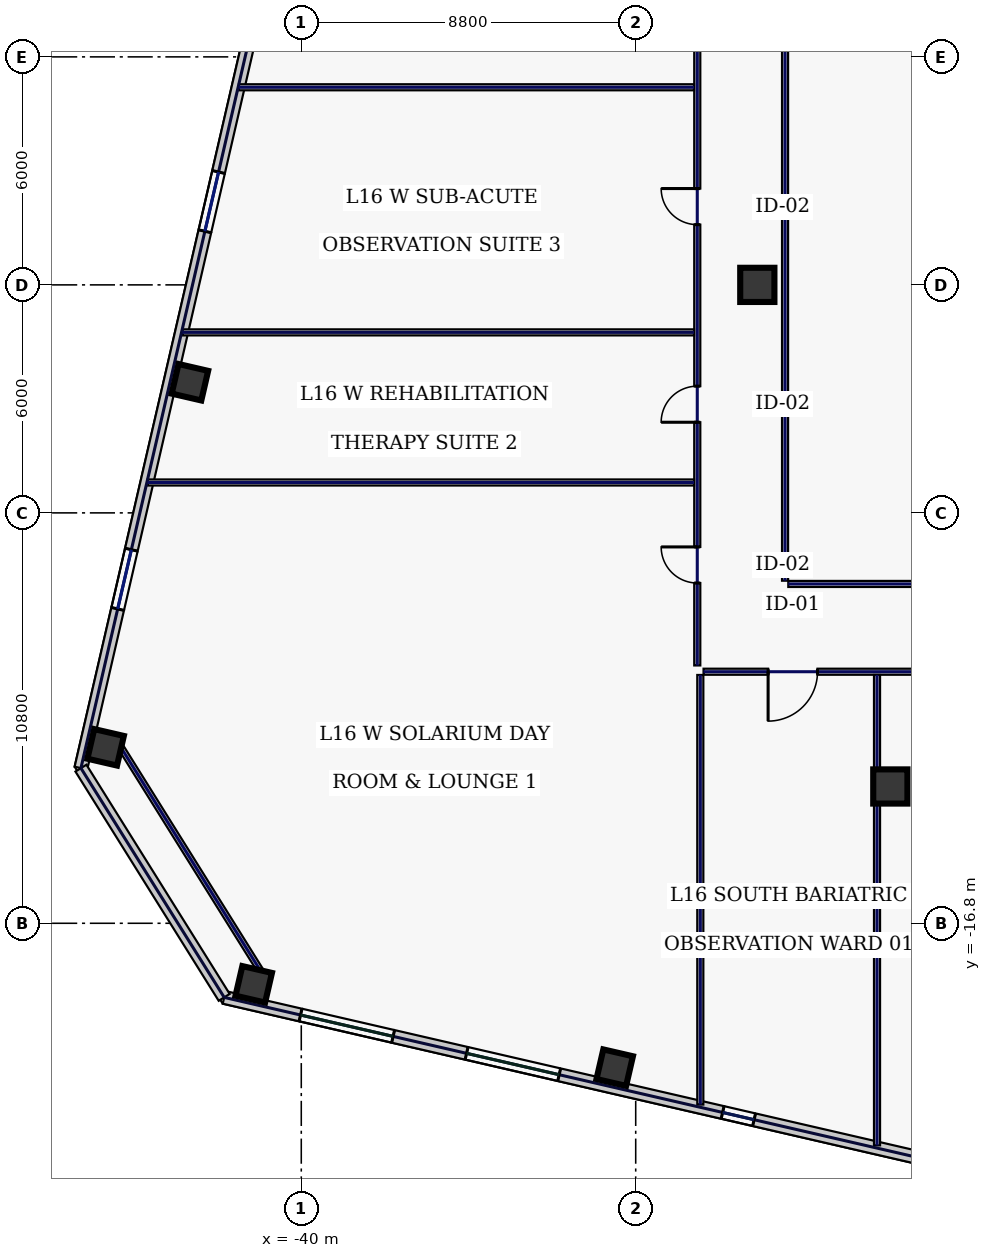
"""IFC4 building model, lengths in metres.
Left out: names, types, materials, properties, quantities, classifications, styles, units other than length and angle.
Written with IfcOpenShell. Run it as: python <this file> out.ifc"""

import sys

from ifc_helpers import new_model, si_unit, direction, frame, frame_2d, origin, origin_2d, place, context, subcontext, project, spatial, rectangle, hollow_rectangle, extrude, element, fill, save


model = new_model("IFC4")
c1 = context("Model", 3, precision=1e-05, world=origin(), true_north=direction((0.0, 1.0)))
c2 = subcontext(c1, "Body", "Model", "MODEL_VIEW")
j1 = project(units=[si_unit("LENGTHUNIT", "METRE"), si_unit("PLANEANGLEUNIT", "RADIAN")], contexts=[c1])
p1 = place(None, origin())
s1 = spatial("IfcSite", under=j1, at=p1, CompositionType="ELEMENT")
p2 = place(p1, origin())
s2 = spatial("IfcBuilding", under=s1, at=p2, CompositionType="ELEMENT")
p3 = place(p2, frame((0.0, 0.0, 75.4)))
s3 = spatial("IfcBuildingStorey", under=s2, at=p3, CompositionType="ELEMENT", Elevation=75.4)
for number, where, z_axis, x_axis in (
    (1, (-24.5, -13.2, 0.0), (0.0, 0.0, 1.0), (1.0, 0.0, 0.0)),
    (2, (-28.0, 0.0, 0.0), (0.0, 0.0, 1.0), (1.0, 0.0, 0.0)),
):
    element("IfcColumn", number, at=place(p3, frame(where, z_axis=z_axis, x_axis=x_axis)), inside=s3, PredefinedType="COLUMN", context=c2, shape_type="SweptSolid", body=[
        extrude(hollow_rectangle(XDim=0.9, YDim=0.9, WallThickness=0.04, at=origin_2d()), origin(), (0.0, 0.0, 1.0), 3.74),
    ])
for number, where, z_axis, x_axis in (
    (3, (-41.251, -18.406, 0.0), (0.0, 0.0, 1.0), (0.974, -0.225, 0.0)),
    (4, (-31.752, -20.599, 0.0), (0.0, 0.0, 1.0), (0.974, -0.225, 0.0)),
    (5, (-42.93, -2.562, 0.0), (0.0, 0.0, 1.0), (0.974, -0.225, 0.0)),
    (6, (-45.148, -12.169, 0.0), (0.0, 0.0, 1.0), (0.974, -0.225, 0.0)),
):
    element("IfcColumn", number, at=place(p3, frame(where, z_axis=z_axis, x_axis=x_axis)), inside=s3, PredefinedType="COLUMN", context=c2, shape_type="SweptSolid", body=[
        extrude(hollow_rectangle(XDim=0.8, YDim=0.8, WallThickness=0.036, at=origin_2d()), origin(), (0.0, 0.0, 1.0), 3.74),
    ])
p4 = place(p3, frame((-42.029, -18.75, 0.0), z_axis=(0.0, 0.0, 1.0), x_axis=(0.97436993772, -0.224951604723, 0.0)))
e7 = element("IfcWall", 7, at=p4, inside=s3, PredefinedType="STANDARD", context=c2, shape_type="SweptSolid", body=[
    extrude(rectangle(XDim=22.651, YDim=0.34, at=frame_2d((11.326, 0.0))), origin(), (0.0, 0.0, 1.0), 3.74),
])
p5 = place(p4, frame((2.062, 0.0, 0.72)))
e8 = element("IfcOpeningElement", 8, at=p5, cuts=e7, PredefinedType="OPENING", context=c2, shape_type="SweptSolid", body=[
    extrude(rectangle(XDim=2.5, YDim=2.15, at=frame_2d((1.25, 1.075))), frame((0.0, 0.18, 0.0), z_axis=(0.0, -1.0, 0.0), x_axis=(1.0, 0.0, 0.0)), (0.0, 0.0, 1.0), 0.36),
])
p6 = place(p4, frame((6.546, 0.0, 0.72)))
e9 = element("IfcOpeningElement", 9, at=p6, cuts=e7, PredefinedType="OPENING", context=c2, shape_type="SweptSolid", body=[
    extrude(rectangle(XDim=2.5, YDim=2.15, at=frame_2d((1.25, 1.075))), frame((0.0, 0.18, 0.0), z_axis=(0.0, -1.0, 0.0), x_axis=(1.0, 0.0, 0.0)), (0.0, 0.0, 1.0), 0.36),
])
p7 = place(p4, frame((13.461, 0.0, 0.72)))
e10 = element("IfcOpeningElement", 10, at=p7, cuts=e7, PredefinedType="OPENING", context=c2, shape_type="SweptSolid", body=[
    extrude(rectangle(XDim=0.85, YDim=1.85, at=frame_2d((0.425, 0.925))), frame((0.0, 0.18, 0.0), z_axis=(0.0, -1.0, 0.0), x_axis=(1.0, 0.0, 0.0)), (0.0, 0.0, 1.0), 0.36),
])
p8 = place(p3, frame((-36.62, 27.037, 0.0), z_axis=(0.0, 0.0, 1.0), x_axis=(-0.224951280646, -0.974370012539, 0.0)))
e11 = element("IfcWall", 11, at=p8, inside=s3, PredefinedType="STANDARD", context=c2, shape_type="SweptSolid", body=[
    extrude(rectangle(XDim=40.8, YDim=0.34, at=frame_2d((20.4, 0.0))), origin(), (0.0, 0.0, 1.0), 3.74),
])
p9 = place(p8, frame((4.3, 0.0, 0.58)))
e12 = element("IfcOpeningElement", 12, at=p9, cuts=e11, PredefinedType="OPENING", context=c2, shape_type="SweptSolid", body=[
    extrude(rectangle(XDim=1.6, YDim=2.3, at=frame_2d((0.8, 1.15))), frame((0.0, 0.18, 0.0), z_axis=(0.0, -1.0, 0.0), x_axis=(1.0, 0.0, 0.0)), (0.0, 0.0, 1.0), 0.36),
])
p10 = place(p8, frame((14.5, 0.0, 0.58)))
e13 = element("IfcOpeningElement", 13, at=p10, cuts=e11, PredefinedType="OPENING", context=c2, shape_type="SweptSolid", body=[
    extrude(rectangle(XDim=1.6, YDim=2.3, at=frame_2d((0.8, 1.15))), frame((0.0, 0.18, 0.0), z_axis=(0.0, -1.0, 0.0), x_axis=(1.0, 0.0, 0.0)), (0.0, 0.0, 1.0), 0.36),
])
p11 = place(p8, frame((24.7, 0.0, 0.58)))
e14 = element("IfcOpeningElement", 14, at=p11, cuts=e11, PredefinedType="OPENING", context=c2, shape_type="SweptSolid", body=[
    extrude(rectangle(XDim=1.6, YDim=2.3, at=frame_2d((0.8, 1.15))), frame((0.0, 0.18, 0.0), z_axis=(0.0, -1.0, 0.0), x_axis=(1.0, 0.0, 0.0)), (0.0, 0.0, 1.0), 0.36),
])
p12 = place(p8, frame((34.9, 0.0, 0.58)))
e15 = element("IfcOpeningElement", 15, at=p12, cuts=e11, PredefinedType="OPENING", context=c2, shape_type="SweptSolid", body=[
    extrude(rectangle(XDim=1.6, YDim=2.3, at=frame_2d((0.8, 1.15))), frame((0.0, 0.18, 0.0), z_axis=(0.0, -1.0, 0.0), x_axis=(1.0, 0.0, 0.0)), (0.0, 0.0, 1.0), 0.36),
])
p13 = place(p3, frame((-45.798, -12.717, 0.0), z_axis=(0.0, 0.0, 1.0), x_axis=(0.529906387556, -0.848056142261, 0.0)))
e16 = element("IfcWall", 16, at=p13, inside=s3, PredefinedType="STANDARD", context=c2, shape_type="SweptSolid", body=[
    extrude(rectangle(XDim=7.114, YDim=0.34, at=frame_2d((3.557, 0.0))), origin(), (0.0, 0.0, 1.0), 3.74),
])
p14 = place(p3, frame((-44.86, -11.989, 0.0), z_axis=(0.0, 0.0, 1.0), x_axis=(0.52991239767, -0.848052386823, 0.0)))
e17 = element("IfcWall", 17, at=p14, inside=s3, PredefinedType="PARTITIONING", context=c2, shape_type="SweptSolid", body=[
    extrude(rectangle(XDim=7.354, YDim=0.16, at=frame_2d((3.677, 0.0))), origin(), (0.0, 0.0, 1.0), 3.74),
])
p15 = place(p3, frame((-29.58, -10.015, 0.0), z_axis=(0.0, 0.0, 1.0), x_axis=(0.0, 1.0, 0.0)))
e18 = element("IfcWall", 18, at=p15, inside=s3, PredefinedType="PARTITIONING", context=c2, shape_type="SweptSolid", body=[
    extrude(rectangle(XDim=20.13, YDim=0.16, at=frame_2d((10.065, 0.0))), origin(), (0.0, 0.0, 1.0), 3.74),
])
p16 = place(p15, frame((2.169, 0.0, 0.0)))
e19 = element("IfcOpeningElement", 19, at=p16, cuts=e18, PredefinedType="OPENING", context=c2, shape_type="SweptSolid", body=[
    extrude(rectangle(XDim=0.95, YDim=2.2, at=frame_2d((0.475, 1.1))), frame((0.0, 0.09, 0.0), z_axis=(0.0, -1.0, 0.0), x_axis=(1.0, 0.0, 0.0)), (0.0, 0.0, 1.0), 0.18),
])
p17 = place(p15, frame((6.4, 0.0, 0.0)))
e20 = element("IfcOpeningElement", 20, at=p17, cuts=e18, PredefinedType="OPENING", context=c2, shape_type="SweptSolid", body=[
    extrude(rectangle(XDim=0.95, YDim=2.2, at=frame_2d((0.475, 1.1))), frame((0.0, 0.09, 0.0), z_axis=(0.0, -1.0, 0.0), x_axis=(1.0, 0.0, 0.0)), (0.0, 0.0, 1.0), 0.18),
])
p18 = place(p15, frame((11.6, 0.0, 0.0)))
e21 = element("IfcOpeningElement", 21, at=p18, cuts=e18, PredefinedType="OPENING", context=c2, shape_type="SweptSolid", body=[
    extrude(rectangle(XDim=0.95, YDim=2.2, at=frame_2d((0.475, 1.1))), frame((0.0, 0.09, 0.0), z_axis=(0.0, -1.0, 0.0), x_axis=(1.0, 0.0, 0.0)), (0.0, 0.0, 1.0), 0.18),
])
p19 = place(p15, frame((17.131, 0.0, 0.0)))
e22 = element("IfcOpeningElement", 22, at=p19, cuts=e18, PredefinedType="OPENING", context=c2, shape_type="SweptSolid", body=[
    extrude(rectangle(XDim=0.95, YDim=2.2, at=frame_2d((0.475, 1.1))), frame((0.0, 0.09, 0.0), z_axis=(0.0, -1.0, 0.0), x_axis=(1.0, 0.0, 0.0)), (0.0, 0.0, 1.0), 0.18),
])
p20 = place(p3, frame((29.415, -10.18, 0.0), z_axis=(0.0, 0.0, 1.0), x_axis=(-1.0, 0.0, 0.0)))
e23 = element("IfcWall", 23, at=p20, inside=s3, PredefinedType="PARTITIONING", context=c2, shape_type="SweptSolid", body=[
    extrude(rectangle(XDim=58.83, YDim=0.16, at=frame_2d((29.415, 0.0))), origin(), (0.0, 0.0, 1.0), 3.74),
])
p21 = place(p20, frame((55.831, 0.0, 0.0)))
e24 = element("IfcOpeningElement", 24, at=p21, cuts=e23, PredefinedType="OPENING", context=c2, shape_type="SweptSolid", body=[
    extrude(rectangle(XDim=1.3, YDim=2.2, at=frame_2d((0.65, 1.1))), frame((0.0, 0.09, 0.0), z_axis=(0.0, -1.0, 0.0), x_axis=(1.0, 0.0, 0.0)), (0.0, 0.0, 1.0), 0.18),
])
p22 = place(p20, frame((49.775, 0.0, 0.0)))
e25 = element("IfcOpeningElement", 25, at=p22, cuts=e23, PredefinedType="OPENING", context=c2, shape_type="SweptSolid", body=[
    extrude(rectangle(XDim=1.3, YDim=2.2, at=frame_2d((0.65, 1.1))), frame((0.0, 0.09, 0.0), z_axis=(0.0, -1.0, 0.0), x_axis=(1.0, 0.0, 0.0)), (0.0, 0.0, 1.0), 0.18),
])
p23 = place(p20, frame((43.2, 0.0, 0.0)))
e26 = element("IfcOpeningElement", 26, at=p23, cuts=e23, PredefinedType="OPENING", context=c2, shape_type="SweptSolid", body=[
    extrude(rectangle(XDim=0.95, YDim=2.2, at=frame_2d((0.475, 1.1))), frame((0.0, 0.09, 0.0), z_axis=(0.0, -1.0, 0.0), x_axis=(1.0, 0.0, 0.0)), (0.0, 0.0, 1.0), 0.18),
])
p24 = place(p20, frame((38.0, 0.0, 0.0)))
e27 = element("IfcOpeningElement", 27, at=p24, cuts=e23, PredefinedType="OPENING", context=c2, shape_type="SweptSolid", body=[
    extrude(rectangle(XDim=0.95, YDim=2.2, at=frame_2d((0.475, 1.1))), frame((0.0, 0.09, 0.0), z_axis=(0.0, -1.0, 0.0), x_axis=(1.0, 0.0, 0.0)), (0.0, 0.0, 1.0), 0.18),
])
p25 = place(p20, frame((32.7, 0.0, 0.0)))
e28 = element("IfcOpeningElement", 28, at=p25, cuts=e23, PredefinedType="OPENING", context=c2, shape_type="SweptSolid", body=[
    extrude(rectangle(XDim=0.95, YDim=2.2, at=frame_2d((0.475, 1.1))), frame((0.0, 0.09, 0.0), z_axis=(0.0, -1.0, 0.0), x_axis=(1.0, 0.0, 0.0)), (0.0, 0.0, 1.0), 0.18),
])
p26 = place(p20, frame((27.3, 0.0, 0.0)))
e29 = element("IfcOpeningElement", 29, at=p26, cuts=e23, PredefinedType="OPENING", context=c2, shape_type="SweptSolid", body=[
    extrude(rectangle(XDim=0.95, YDim=2.2, at=frame_2d((0.475, 1.1))), frame((0.0, 0.09, 0.0), z_axis=(0.0, -1.0, 0.0), x_axis=(1.0, 0.0, 0.0)), (0.0, 0.0, 1.0), 0.18),
])
p27 = place(p20, frame((21.87, 0.0, 0.0)))
e30 = element("IfcOpeningElement", 30, at=p27, cuts=e23, PredefinedType="OPENING", context=c2, shape_type="SweptSolid", body=[
    extrude(rectangle(XDim=1.05, YDim=2.2, at=frame_2d((0.525, 1.1))), frame((0.0, 0.09, 0.0), z_axis=(0.0, -1.0, 0.0), x_axis=(1.0, 0.0, 0.0)), (0.0, 0.0, 1.0), 0.18),
])
p28 = place(p20, frame((16.41, 0.0, 0.0)))
e31 = element("IfcOpeningElement", 31, at=p28, cuts=e23, PredefinedType="OPENING", context=c2, shape_type="SweptSolid", body=[
    extrude(rectangle(XDim=0.95, YDim=2.2, at=frame_2d((0.475, 1.1))), frame((0.0, 0.09, 0.0), z_axis=(0.0, -1.0, 0.0), x_axis=(1.0, 0.0, 0.0)), (0.0, 0.0, 1.0), 0.18),
])
p29 = place(p20, frame((11.66, 0.0, 0.0)))
e32 = element("IfcOpeningElement", 32, at=p29, cuts=e23, PredefinedType="OPENING", context=c2, shape_type="SweptSolid", body=[
    extrude(rectangle(XDim=1.45, YDim=2.2, at=frame_2d((0.725, 1.1))), frame((0.0, 0.09, 0.0), z_axis=(0.0, -1.0, 0.0), x_axis=(1.0, 0.0, 0.0)), (0.0, 0.0, 1.0), 0.18),
])
p30 = place(p20, frame((7.97, 0.0, 0.0)))
e33 = element("IfcOpeningElement", 33, at=p30, cuts=e23, PredefinedType="OPENING", context=c2, shape_type="SweptSolid", body=[
    extrude(rectangle(XDim=1.3, YDim=2.2, at=frame_2d((0.65, 1.1))), frame((0.0, 0.09, 0.0), z_axis=(0.0, -1.0, 0.0), x_axis=(1.0, 0.0, 0.0)), (0.0, 0.0, 1.0), 0.18),
])
p31 = place(p20, frame((4.375, 0.0, 0.0)))
e34 = element("IfcOpeningElement", 34, at=p31, cuts=e23, PredefinedType="OPENING", context=c2, shape_type="SweptSolid", body=[
    extrude(rectangle(XDim=1.3, YDim=2.2, at=frame_2d((0.65, 1.1))), frame((0.0, 0.09, 0.0), z_axis=(0.0, -1.0, 0.0), x_axis=(1.0, 0.0, 0.0)), (0.0, 0.0, 1.0), 0.18),
])
p32 = place(p20, frame((1.244, 0.0, 0.0)))
e35 = element("IfcOpeningElement", 35, at=p32, cuts=e23, PredefinedType="OPENING", context=c2, shape_type="SweptSolid", body=[
    extrude(rectangle(XDim=1.05, YDim=2.2, at=frame_2d((0.525, 1.1))), frame((0.0, 0.09, 0.0), z_axis=(0.0, -1.0, 0.0), x_axis=(1.0, 0.0, 0.0)), (0.0, 0.0, 1.0), 0.18),
])
p33 = place(p3, frame((-27.27, 7.885, 0.0), z_axis=(0.0, 0.0, 1.0), x_axis=(0.0, -1.0, 0.0)))
e36 = element("IfcWall", 36, at=p33, inside=s3, PredefinedType="PARTITIONING", context=c2, shape_type="SweptSolid", body=[
    extrude(rectangle(XDim=15.67, YDim=0.16, at=frame_2d((7.835, 0.0))), origin(), (0.0, 0.0, 1.0), 3.74),
])
p34 = place(p3, frame((-27.185, -7.87, 0.0), z_axis=(0.0, 0.0, 1.0), x_axis=(1.0, 0.0, 0.0)))
e37 = element("IfcWall", 37, at=p34, inside=s3, PredefinedType="PARTITIONING", context=c2, shape_type="SweptSolid", body=[
    extrude(rectangle(XDim=16.52, YDim=0.16, at=frame_2d((8.26, 0.0))), origin(), (0.0, 0.0, 1.0), 3.74),
])
p35 = place(p3, frame((-29.5, -21.571, 0.0), z_axis=(0.0, 0.0, 1.0), x_axis=(0.0, 1.0, 0.0)))
e38 = element("IfcWall", 38, at=p35, inside=s3, PredefinedType="PARTITIONING", context=c2, shape_type="SweptSolid", body=[
    extrude(rectangle(XDim=11.306, YDim=0.16, at=frame_2d((5.653, 0.0))), origin(), (0.0, 0.0, 1.0), 3.74),
])
p36 = place(p3, frame((-24.85, -22.644, 0.0), z_axis=(0.0, 0.0, 1.0), x_axis=(0.0, 1.0, 0.0)))
e39 = element("IfcWall", 39, at=p36, inside=s3, PredefinedType="PARTITIONING", context=c2, shape_type="SweptSolid", body=[
    extrude(rectangle(XDim=12.379, YDim=0.16, at=frame_2d((6.189, 0.0))), origin(), (0.0, 0.0, 1.0), 3.74),
])
p37 = place(p3, frame((-44.042, -5.2, 0.0), z_axis=(0.0, 0.0, 1.0), x_axis=(1.0, 0.0, 0.0)))
e40 = element("IfcWall", 40, at=p37, inside=s3, PredefinedType="PARTITIONING", context=c2, shape_type="SweptSolid", body=[
    extrude(rectangle(XDim=14.377, YDim=0.16, at=frame_2d((7.188, 0.0))), origin(), (0.0, 0.0, 1.0), 3.74),
])
p38 = place(p3, frame((-43.13, -1.25, 0.0), z_axis=(0.0, 0.0, 1.0), x_axis=(1.0, 0.0, 0.0)))
e41 = element("IfcWall", 41, at=p38, inside=s3, PredefinedType="PARTITIONING", context=c2, shape_type="SweptSolid", body=[
    extrude(rectangle(XDim=13.465, YDim=0.16, at=frame_2d((6.732, 0.0))), origin(), (0.0, 0.0, 1.0), 3.235),
])
p39 = place(p3, frame((-41.641, 5.2, 0.0), z_axis=(0.0, 0.0, 1.0), x_axis=(1.0, 0.0, 0.0)))
e42 = element("IfcWall", 42, at=p39, inside=s3, PredefinedType="PARTITIONING", context=c2, shape_type="SweptSolid", body=[
    extrude(rectangle(XDim=11.976, YDim=0.16, at=frame_2d((5.988, 0.0))), origin(), (0.0, 0.0, 1.0), 3.74),
])
p40 = place(p5, origin())
e43 = element("IfcWindow", 43, at=p40, inside=s3, PartitioningType="SINGLE_PANEL", PredefinedType="WINDOW", context=c2, shape_type="SweptSolid", body=[
    extrude(rectangle(XDim=2.5, YDim=2.15, at=frame_2d((1.25, 1.075))), frame((0.0, 0.03, 0.0), z_axis=(0.0, -1.0, 0.0), x_axis=(1.0, 0.0, 0.0)), (0.0, 0.0, 1.0), 0.06),
])
fill(e8, e43)
p41 = place(p6, origin())
e44 = element("IfcWindow", 44, at=p41, inside=s3, PartitioningType="SINGLE_PANEL", PredefinedType="WINDOW", context=c2, shape_type="SweptSolid", body=[
    extrude(rectangle(XDim=2.5, YDim=2.15, at=frame_2d((1.25, 1.075))), frame((0.0, 0.03, 0.0), z_axis=(0.0, -1.0, 0.0), x_axis=(1.0, 0.0, 0.0)), (0.0, 0.0, 1.0), 0.06),
])
fill(e9, e44)
p42 = place(p7, origin())
e45 = element("IfcWindow", 45, at=p42, inside=s3, PartitioningType="SINGLE_PANEL", PredefinedType="WINDOW", context=c2, shape_type="SweptSolid", body=[
    extrude(rectangle(XDim=0.85, YDim=1.85, at=frame_2d((0.425, 0.925))), frame((0.0, 0.03, 0.0), z_axis=(0.0, -1.0, 0.0), x_axis=(1.0, 0.0, 0.0)), (0.0, 0.0, 1.0), 0.06),
])
fill(e10, e45)
p43 = place(p11, origin())
e46 = element("IfcWindow", 46, at=p43, inside=s3, PartitioningType="SINGLE_PANEL", PredefinedType="WINDOW", context=c2, shape_type="SweptSolid", body=[
    extrude(rectangle(XDim=1.6, YDim=2.3, at=frame_2d((0.8, 1.15))), frame((0.0, 0.03, 0.0), z_axis=(0.0, -1.0, 0.0), x_axis=(1.0, 0.0, 0.0)), (0.0, 0.0, 1.0), 0.06),
])
fill(e14, e46)
p44 = place(p12, origin())
e47 = element("IfcWindow", 47, at=p44, inside=s3, PartitioningType="SINGLE_PANEL", PredefinedType="WINDOW", context=c2, shape_type="SweptSolid", body=[
    extrude(rectangle(XDim=1.6, YDim=2.3, at=frame_2d((0.8, 1.15))), frame((0.0, 0.03, 0.0), z_axis=(0.0, -1.0, 0.0), x_axis=(1.0, 0.0, 0.0)), (0.0, 0.0, 1.0), 0.06),
])
fill(e15, e47)
p45 = place(p21, origin())
e48 = element("IfcDoor", 48, at=p45, inside=s3, OperationType="SINGLE_SWING_RIGHT", PredefinedType="DOOR", context=c2, shape_type="SweptSolid", body=[
    extrude(rectangle(XDim=1.3, YDim=2.2, at=frame_2d((0.65, 1.1))), frame((0.0, 0.025, 0.0), z_axis=(0.0, -1.0, 0.0), x_axis=(1.0, 0.0, 0.0)), (0.0, 0.0, 1.0), 0.05),
])
fill(e24, e48)
p46 = place(p16, origin())
e49 = element("IfcDoor", 49, at=p46, inside=s3, OperationType="SINGLE_SWING_RIGHT", PredefinedType="DOOR", context=c2, shape_type="SweptSolid", body=[
    extrude(rectangle(XDim=0.95, YDim=2.2, at=frame_2d((0.475, 1.1))), frame((0.0, 0.025, 0.0), z_axis=(0.0, -1.0, 0.0), x_axis=(1.0, 0.0, 0.0)), (0.0, 0.0, 1.0), 0.05),
])
fill(e19, e49)
p47 = place(p17, origin())
e50 = element("IfcDoor", 50, at=p47, inside=s3, OperationType="SINGLE_SWING_LEFT", PredefinedType="DOOR", context=c2, shape_type="SweptSolid", body=[
    extrude(rectangle(XDim=0.95, YDim=2.2, at=frame_2d((0.475, 1.1))), frame((0.0, 0.025, 0.0), z_axis=(0.0, -1.0, 0.0), x_axis=(1.0, 0.0, 0.0)), (0.0, 0.0, 1.0), 0.05),
])
fill(e20, e50)
p48 = place(p18, origin())
e51 = element("IfcDoor", 51, at=p48, inside=s3, OperationType="SINGLE_SWING_RIGHT", PredefinedType="DOOR", context=c2, shape_type="SweptSolid", body=[
    extrude(rectangle(XDim=0.95, YDim=2.2, at=frame_2d((0.475, 1.1))), frame((0.0, 0.025, 0.0), z_axis=(0.0, -1.0, 0.0), x_axis=(1.0, 0.0, 0.0)), (0.0, 0.0, 1.0), 0.05),
])
fill(e21, e51)
save(model, sys.argv[1])
